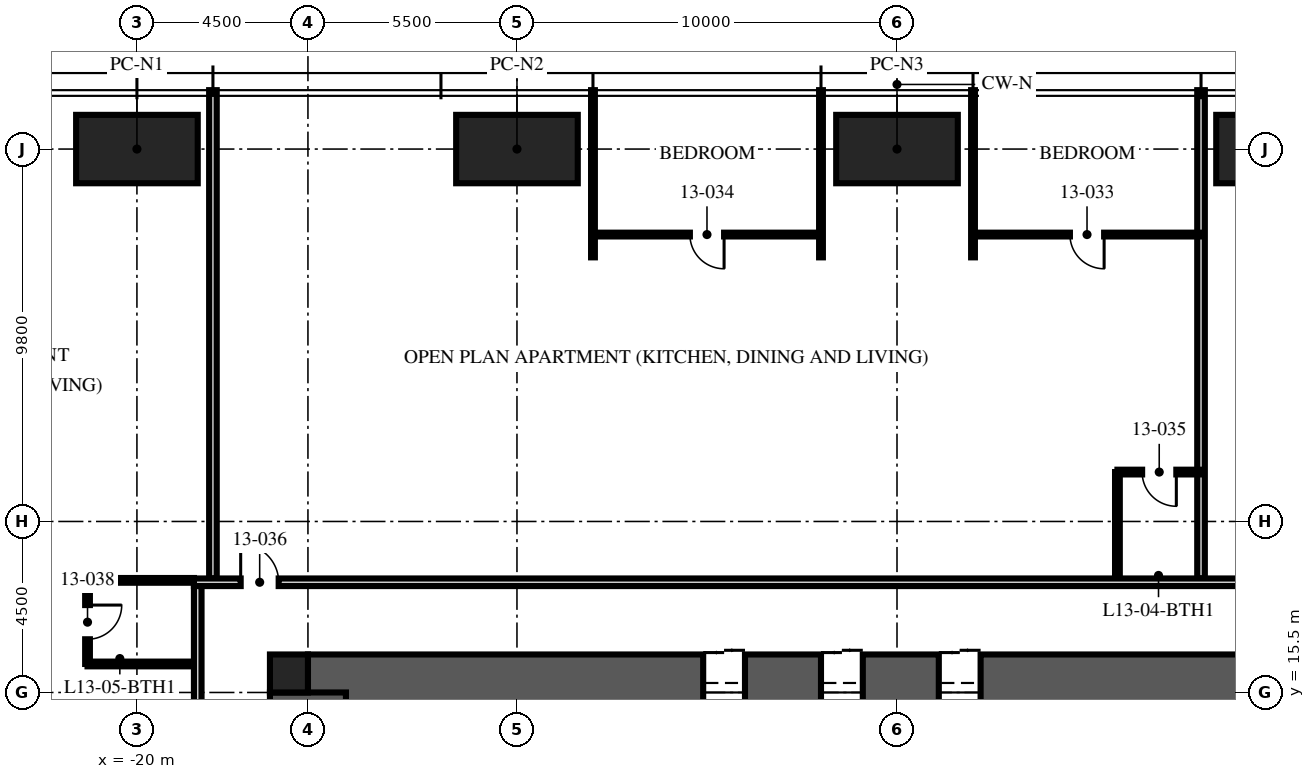
"""IFC4 building model, lengths in metres.
Left out: names, types, materials, properties, quantities, classifications, styles, units other than length and angle.
Written with IfcOpenShell. Run it as: python <this file> out.ifc"""

import sys

from ifc_helpers import new_model, si_unit, direction, frame, frame_2d, origin, origin_2d, place, context, subcontext, project, spatial, rectangle, hollow_rectangle, extrude, element, fill, save


model = new_model("IFC4")
c1 = context("Model", 3, precision=1e-05, world=origin(), true_north=direction((0.0, 1.0)))
c2 = subcontext(c1, "Body", "Model", "MODEL_VIEW")
j1 = project(units=[si_unit("LENGTHUNIT", "METRE"), si_unit("PLANEANGLEUNIT", "RADIAN")], contexts=[c1])
p1 = place(None, origin())
s1 = spatial("IfcSite", under=j1, at=p1, CompositionType="ELEMENT")
p2 = place(p1, origin())
s2 = spatial("IfcBuilding", under=s1, at=p2, CompositionType="ELEMENT")
p3 = place(p2, frame((0.0, 0.0, 54.75)))
s3 = spatial("IfcBuildingStorey", under=s2, at=p3, CompositionType="ELEMENT", Elevation=54.75)
p4 = place(p3, frame((-15.5, 15.5, -0.25), z_axis=(0.0, 0.0, 1.0), x_axis=(1.0, 0.0, 0.0)))
e1 = element("IfcWall", 1, at=p4, inside=s3, PredefinedType="SHEAR", context=c2, shape_type="SweptSolid", body=[
    extrude(rectangle(XDim=31.0, YDim=2.0, at=frame_2d((15.5, 0.0))), origin(), (0.0, 0.0, 1.0), 3.75),
])
p5 = place(p4, frame((10.4, 0.0, 0.25)))
e2 = element("IfcOpeningElement", 2, at=p5, cuts=e1, PredefinedType="OPENING", context=c2, shape_type="SweptSolid", body=[
    extrude(rectangle(XDim=1.1, YDim=2.1, at=frame_2d((0.55, 1.05))), frame((0.0, 1.01, 0.0), z_axis=(0.0, -1.0, 0.0), x_axis=(1.0, 0.0, 0.0)), (0.0, 0.0, 1.0), 2.02),
])
p6 = place(p4, frame((13.5, 0.0, 0.25)))
e3 = element("IfcOpeningElement", 3, at=p6, cuts=e1, PredefinedType="OPENING", context=c2, shape_type="SweptSolid", body=[
    extrude(rectangle(XDim=1.1, YDim=2.1, at=frame_2d((0.55, 1.05))), frame((0.0, 1.01, 0.0), z_axis=(0.0, -1.0, 0.0), x_axis=(1.0, 0.0, 0.0)), (0.0, 0.0, 1.0), 2.02),
])
p7 = place(p4, frame((16.6, 0.0, 0.25)))
e4 = element("IfcOpeningElement", 4, at=p7, cuts=e1, PredefinedType="OPENING", context=c2, shape_type="SweptSolid", body=[
    extrude(rectangle(XDim=1.1, YDim=2.1, at=frame_2d((0.55, 1.05))), frame((0.0, 1.01, 0.0), z_axis=(0.0, -1.0, 0.0), x_axis=(1.0, 0.0, 0.0)), (0.0, 0.0, 1.0), 2.02),
])
p8 = place(p3, frame((-15.5, -15.5, -0.25), z_axis=(0.0, 0.0, 1.0), x_axis=(0.0, 1.0, 0.0)))
e5 = element("IfcWall", 5, at=p8, inside=s3, PredefinedType="SHEAR", context=c2, shape_type="SweptSolid", body=[
    extrude(rectangle(XDim=31.0, YDim=2.0, at=frame_2d((15.5, 0.0))), origin(), (0.0, 0.0, 1.0), 3.75),
])
p9 = place(p8, frame((6.5, 0.0, 0.25)))
e6 = element("IfcOpeningElement", 6, at=p9, cuts=e5, PredefinedType="OPENING", context=c2, shape_type="SweptSolid", body=[
    extrude(rectangle(XDim=1.2, YDim=2.1, at=frame_2d((0.6, 1.05))), frame((0.0, 1.01, 0.0), z_axis=(0.0, -1.0, 0.0), x_axis=(1.0, 0.0, 0.0)), (0.0, 0.0, 1.0), 2.02),
])
p10 = place(p8, frame((23.0, 0.0, 0.25)))
e7 = element("IfcOpeningElement", 7, at=p10, cuts=e5, PredefinedType="OPENING", context=c2, shape_type="SweptSolid", body=[
    extrude(rectangle(XDim=1.8, YDim=2.1, at=frame_2d((0.9, 1.05))), frame((0.0, 1.01, 0.0), z_axis=(0.0, -1.0, 0.0), x_axis=(1.0, 0.0, 0.0)), (0.0, 0.0, 1.0), 2.02),
])
p11 = place(p3, frame((-16.0, 16.0, -0.25), z_axis=(0.0, 0.0, 1.0), x_axis=(1.0, 0.0, 0.0)))
e8 = element("IfcColumn", 8, at=p11, inside=s3, PredefinedType="COLUMN", context=c2, shape_type="SweptSolid", body=[
    extrude(rectangle(XDim=1.0, YDim=1.0, at=origin_2d()), origin(), (0.0, 0.0, 1.0), 3.75),
])
for number, where, z_axis, x_axis in (
    (9, (-20.0, 29.8, 0.0), (0.0, 0.0, 1.0), (1.0, 0.0, 0.0)),
    (10, (-10.0, 29.8, 0.0), (0.0, 0.0, 1.0), (1.0, 0.0, 0.0)),
    (11, (0.0, 29.8, 0.0), (0.0, 0.0, 1.0), (1.0, 0.0, 0.0)),
    (12, (10.0, 29.8, 0.0), (0.0, 0.0, 1.0), (1.0, 0.0, 0.0)),
):
    element("IfcColumn", number, at=place(p3, frame(where, z_axis=z_axis, x_axis=x_axis)), inside=s3, PredefinedType="COLUMN", context=c2, shape_type="SweptSolid", body=[
        extrude(hollow_rectangle(XDim=3.2, YDim=1.8, WallThickness=0.2, at=origin_2d()), origin(), (0.0, 0.0, 1.0), 3.75),
    ])
p12 = place(p3, frame((8.0, 18.5, 0.0), z_axis=(0.0, 0.0, 1.0), x_axis=(0.0, 1.0, 0.0)))
e13 = element("IfcWall", 13, at=p12, inside=s3, PredefinedType="PARTITIONING", context=c2, shape_type="SweptSolid", body=[
    extrude(rectangle(XDim=12.85, YDim=0.2, at=frame_2d((6.425, 0.0))), origin(), (0.0, 0.0, 1.0), 2.71),
])
for number, where, z_axis, x_axis in (
    (14, (2.0, 26.95, 0.0), (0.0, 0.0, 1.0), (0.0, 1.0, 0.0)),
    (15, (-2.0, 26.95, 0.0), (0.0, 0.0, 1.0), (0.0, 1.0, 0.0)),
    (16, (-8.0, 26.95, 0.0), (0.0, 0.0, 1.0), (0.0, 1.0, 0.0)),
):
    element("IfcWall", number, at=place(p3, frame(where, z_axis=z_axis, x_axis=x_axis)), inside=s3, PredefinedType="PARTITIONING", context=c2, shape_type="SweptSolid", body=[
        extrude(rectangle(XDim=4.4, YDim=0.1, at=frame_2d((2.2, 0.0))), origin(), (0.0, 0.0, 1.0), 2.71),
    ])
p13 = place(p3, frame((-18.0, 18.5, 0.0), z_axis=(0.0, 0.0, 1.0), x_axis=(0.0, 1.0, 0.0)))
e17 = element("IfcWall", 17, at=p13, inside=s3, PredefinedType="PARTITIONING", context=c2, shape_type="SweptSolid", body=[
    extrude(rectangle(XDim=12.85, YDim=0.2, at=frame_2d((6.425, 0.0))), origin(), (0.0, 0.0, 1.0), 2.3),
])
p14 = place(p3, frame((8.0, 27.55, 0.0), z_axis=(0.0, 0.0, 1.0), x_axis=(-1.0, 0.0, 0.0)))
e18 = element("IfcWall", 18, at=p14, inside=s3, PredefinedType="PARTITIONING", context=c2, shape_type="SweptSolid", body=[
    extrude(rectangle(XDim=6.0, YDim=0.1, at=frame_2d((3.0, 0.0))), origin(), (0.0, 0.0, 1.0), 2.61),
])
p15 = place(p14, frame((2.55, 0.0, 0.0)))
e19 = element("IfcOpeningElement", 19, at=p15, cuts=e18, PredefinedType="OPENING", context=c2, shape_type="SweptSolid", body=[
    extrude(rectangle(XDim=0.9, YDim=2.1, at=frame_2d((0.45, 1.05))), frame((0.0, 0.06, 0.0), z_axis=(0.0, -1.0, 0.0), x_axis=(1.0, 0.0, 0.0)), (0.0, 0.0, 1.0), 0.12),
])
p16 = place(p3, frame((-2.0, 27.55, 0.0), z_axis=(0.0, 0.0, 1.0), x_axis=(-1.0, 0.0, 0.0)))
e20 = element("IfcWall", 20, at=p16, inside=s3, PredefinedType="PARTITIONING", context=c2, shape_type="SweptSolid", body=[
    extrude(rectangle(XDim=6.0, YDim=0.1, at=frame_2d((3.0, 0.0))), origin(), (0.0, 0.0, 1.0), 2.61),
])
p17 = place(p16, frame((2.55, 0.0, 0.0)))
e21 = element("IfcOpeningElement", 21, at=p17, cuts=e20, PredefinedType="OPENING", context=c2, shape_type="SweptSolid", body=[
    extrude(rectangle(XDim=0.9, YDim=2.1, at=frame_2d((0.45, 1.05))), frame((0.0, 0.06, 0.0), z_axis=(0.0, -1.0, 0.0), x_axis=(1.0, 0.0, 0.0)), (0.0, 0.0, 1.0), 0.12),
])
p18 = place(p3, frame((8.0, 21.3, 0.0), z_axis=(0.0, 0.0, 1.0), x_axis=(-1.0, 0.0, 0.0)))
e22 = element("IfcWall", 22, at=p18, inside=s3, PredefinedType="PARTITIONING", context=c2, shape_type="SweptSolid", body=[
    extrude(rectangle(XDim=2.2, YDim=0.125, at=frame_2d((1.1, 0.0))), origin(), (0.0, 0.0, 1.0), 3.5),
])
p19 = place(p18, frame((0.65, 0.0, 0.0)))
e23 = element("IfcOpeningElement", 23, at=p19, cuts=e22, PredefinedType="OPENING", context=c2, shape_type="SweptSolid", body=[
    extrude(rectangle(XDim=0.9, YDim=2.1, at=frame_2d((0.45, 1.05))), frame((0.0, 0.073, 0.0), z_axis=(0.0, -1.0, 0.0), x_axis=(1.0, 0.0, 0.0)), (0.0, 0.0, 1.0), 0.145),
])
p20 = place(p3, frame((5.8, 18.5, 0.0), z_axis=(0.0, 0.0, 1.0), x_axis=(0.0, 1.0, 0.0)))
e24 = element("IfcWall", 24, at=p20, inside=s3, PredefinedType="PARTITIONING", context=c2, shape_type="SweptSolid", body=[
    extrude(rectangle(XDim=2.8, YDim=0.125, at=frame_2d((1.4, 0.0))), origin(), (0.0, 0.0, 1.0), 3.5),
])
p21 = place(p3, frame((-21.3, 18.45, 0.0), z_axis=(0.0, 0.0, 1.0), x_axis=(0.0, -1.0, 0.0)))
e25 = element("IfcWall", 25, at=p21, inside=s3, PredefinedType="PARTITIONING", context=c2, shape_type="SweptSolid", body=[
    extrude(rectangle(XDim=2.2, YDim=0.125, at=frame_2d((1.1, 0.0))), origin(), (0.0, 0.0, 1.0), 3.5),
])
p22 = place(p21, frame((0.65, 0.0, 0.0)))
e26 = element("IfcOpeningElement", 26, at=p22, cuts=e25, PredefinedType="OPENING", context=c2, shape_type="SweptSolid", body=[
    extrude(rectangle(XDim=0.9, YDim=2.1, at=frame_2d((0.45, 1.05))), frame((0.0, 0.073, 0.0), z_axis=(0.0, -1.0, 0.0), x_axis=(1.0, 0.0, 0.0)), (0.0, 0.0, 1.0), 0.145),
])
p23 = place(p3, frame((-18.5, 18.45, 0.0), z_axis=(0.0, 0.0, 1.0), x_axis=(-1.0, 0.0, 0.0)))
e27 = element("IfcWall", 27, at=p23, inside=s3, PredefinedType="PARTITIONING", context=c2, shape_type="SweptSolid", body=[
    extrude(rectangle(XDim=2.8, YDim=0.125, at=frame_2d((1.4, 0.0))), origin(), (0.0, 0.0, 1.0), 2.3),
])
p24 = place(p3, frame((-18.5, 16.25, 0.0), z_axis=(0.0, 0.0, 1.0), x_axis=(-1.0, 0.0, 0.0)))
e28 = element("IfcWall", 28, at=p24, inside=s3, PredefinedType="PARTITIONING", context=c2, shape_type="SweptSolid", body=[
    extrude(rectangle(XDim=2.8, YDim=0.125, at=frame_2d((1.4, 0.0))), origin(), (0.0, 0.0, 1.0), 3.5),
])
p25 = place(p3, frame((-18.5, 18.4, 0.0), z_axis=(0.0, 0.0, 1.0), x_axis=(1.0, 0.0, 0.0)))
e29 = element("IfcWall", 29, at=p25, inside=s3, PredefinedType="PARTITIONING", context=c2, shape_type="SweptSolid", body=[
    extrude(rectangle(XDim=37.0, YDim=0.2, at=frame_2d((18.5, 0.0))), origin(), (0.0, 0.0, 1.0), 2.3),
])
p26 = place(p25, frame((1.23, 0.0, 0.0)))
e30 = element("IfcOpeningElement", 30, at=p26, cuts=e29, PredefinedType="OPENING", context=c2, shape_type="SweptSolid", body=[
    extrude(rectangle(XDim=1.0, YDim=2.2, at=frame_2d((0.5, 1.1))), frame((0.0, 0.11, 0.0), z_axis=(0.0, -1.0, 0.0), x_axis=(1.0, 0.0, 0.0)), (0.0, 0.0, 1.0), 0.22),
])
p27 = place(p3, frame((-18.4, 18.3, 0.0), z_axis=(0.0, 0.0, 1.0), x_axis=(0.0, -1.0, 0.0)))
e31 = element("IfcWall", 31, at=p27, inside=s3, PredefinedType="PARTITIONING", context=c2, shape_type="SweptSolid", body=[
    extrude(rectangle(XDim=14.3, YDim=0.2, at=frame_2d((7.15, 0.0))), origin(), (0.0, 0.0, 1.0), 2.3),
])
p28 = place(p27, frame((8.7, 0.0, 0.0)))
e32 = element("IfcOpeningElement", 32, at=p28, cuts=e31, PredefinedType="OPENING", context=c2, shape_type="SweptSolid", body=[
    extrude(rectangle(XDim=1.0, YDim=2.2, at=frame_2d((0.5, 1.1))), frame((0.0, 0.11, 0.0), z_axis=(0.0, -1.0, 0.0), x_axis=(1.0, 0.0, 0.0)), (0.0, 0.0, 1.0), 0.22),
])
p29 = place(p5, origin())
e33 = element("IfcDoor", 33, at=p29, inside=s3, OperationType="DOUBLE_DOOR_SLIDING", PredefinedType="DOOR", context=c2, shape_type="SweptSolid", body=[
    extrude(rectangle(XDim=1.1, YDim=2.1, at=frame_2d((0.55, 1.05))), frame((0.0, 0.025, 0.0), z_axis=(0.0, -1.0, 0.0), x_axis=(1.0, 0.0, 0.0)), (0.0, 0.0, 1.0), 0.05),
])
fill(e2, e33)
p30 = place(p6, origin())
e34 = element("IfcDoor", 34, at=p30, inside=s3, OperationType="DOUBLE_DOOR_SLIDING", PredefinedType="DOOR", context=c2, shape_type="SweptSolid", body=[
    extrude(rectangle(XDim=1.1, YDim=2.1, at=frame_2d((0.55, 1.05))), frame((0.0, 0.025, 0.0), z_axis=(0.0, -1.0, 0.0), x_axis=(1.0, 0.0, 0.0)), (0.0, 0.0, 1.0), 0.05),
])
fill(e3, e34)
p31 = place(p7, origin())
e35 = element("IfcDoor", 35, at=p31, inside=s3, OperationType="DOUBLE_DOOR_SLIDING", PredefinedType="DOOR", context=c2, shape_type="SweptSolid", body=[
    extrude(rectangle(XDim=1.1, YDim=2.1, at=frame_2d((0.55, 1.05))), frame((0.0, 0.025, 0.0), z_axis=(0.0, -1.0, 0.0), x_axis=(1.0, 0.0, 0.0)), (0.0, 0.0, 1.0), 0.05),
])
fill(e4, e35)
p32 = place(p15, origin())
e36 = element("IfcDoor", 36, at=p32, inside=s3, OperationType="SINGLE_SWING_LEFT", PredefinedType="DOOR", context=c2, shape_type="SweptSolid", body=[
    extrude(rectangle(XDim=0.9, YDim=2.1, at=frame_2d((0.45, 1.05))), frame((0.0, 0.025, 0.0), z_axis=(0.0, -1.0, 0.0), x_axis=(1.0, 0.0, 0.0)), (0.0, 0.0, 1.0), 0.05),
])
fill(e19, e36)
p33 = place(p17, origin())
e37 = element("IfcDoor", 37, at=p33, inside=s3, OperationType="SINGLE_SWING_LEFT", PredefinedType="DOOR", context=c2, shape_type="SweptSolid", body=[
    extrude(rectangle(XDim=0.9, YDim=2.1, at=frame_2d((0.45, 1.05))), frame((0.0, 0.025, 0.0), z_axis=(0.0, -1.0, 0.0), x_axis=(1.0, 0.0, 0.0)), (0.0, 0.0, 1.0), 0.05),
])
fill(e21, e37)
p34 = place(p19, origin())
e38 = element("IfcDoor", 38, at=p34, inside=s3, OperationType="SINGLE_SWING_LEFT", PredefinedType="DOOR", context=c2, shape_type="SweptSolid", body=[
    extrude(rectangle(XDim=0.9, YDim=2.1, at=frame_2d((0.45, 1.05))), frame((0.0, 0.025, 0.0), z_axis=(0.0, -1.0, 0.0), x_axis=(1.0, 0.0, 0.0)), (0.0, 0.0, 1.0), 0.05),
])
fill(e23, e38)
p35 = place(p26, origin())
e39 = element("IfcDoor", 39, at=p35, inside=s3, OperationType="SINGLE_SWING_LEFT", PredefinedType="DOOR", context=c2, shape_type="SweptSolid", body=[
    extrude(rectangle(XDim=1.0, YDim=2.2, at=frame_2d((0.5, 1.1))), frame((0.0, 0.025, 0.0), z_axis=(0.0, -1.0, 0.0), x_axis=(1.0, 0.0, 0.0)), (0.0, 0.0, 1.0), 0.05),
])
fill(e30, e39)
p36 = place(p22, origin())
e40 = element("IfcDoor", 40, at=p36, inside=s3, OperationType="SINGLE_SWING_LEFT", PredefinedType="DOOR", context=c2, shape_type="SweptSolid", body=[
    extrude(rectangle(XDim=0.9, YDim=2.1, at=frame_2d((0.45, 1.05))), frame((0.0, 0.025, 0.0), z_axis=(0.0, -1.0, 0.0), x_axis=(1.0, 0.0, 0.0)), (0.0, 0.0, 1.0), 0.05),
])
fill(e26, e40)
save(model, sys.argv[1])
